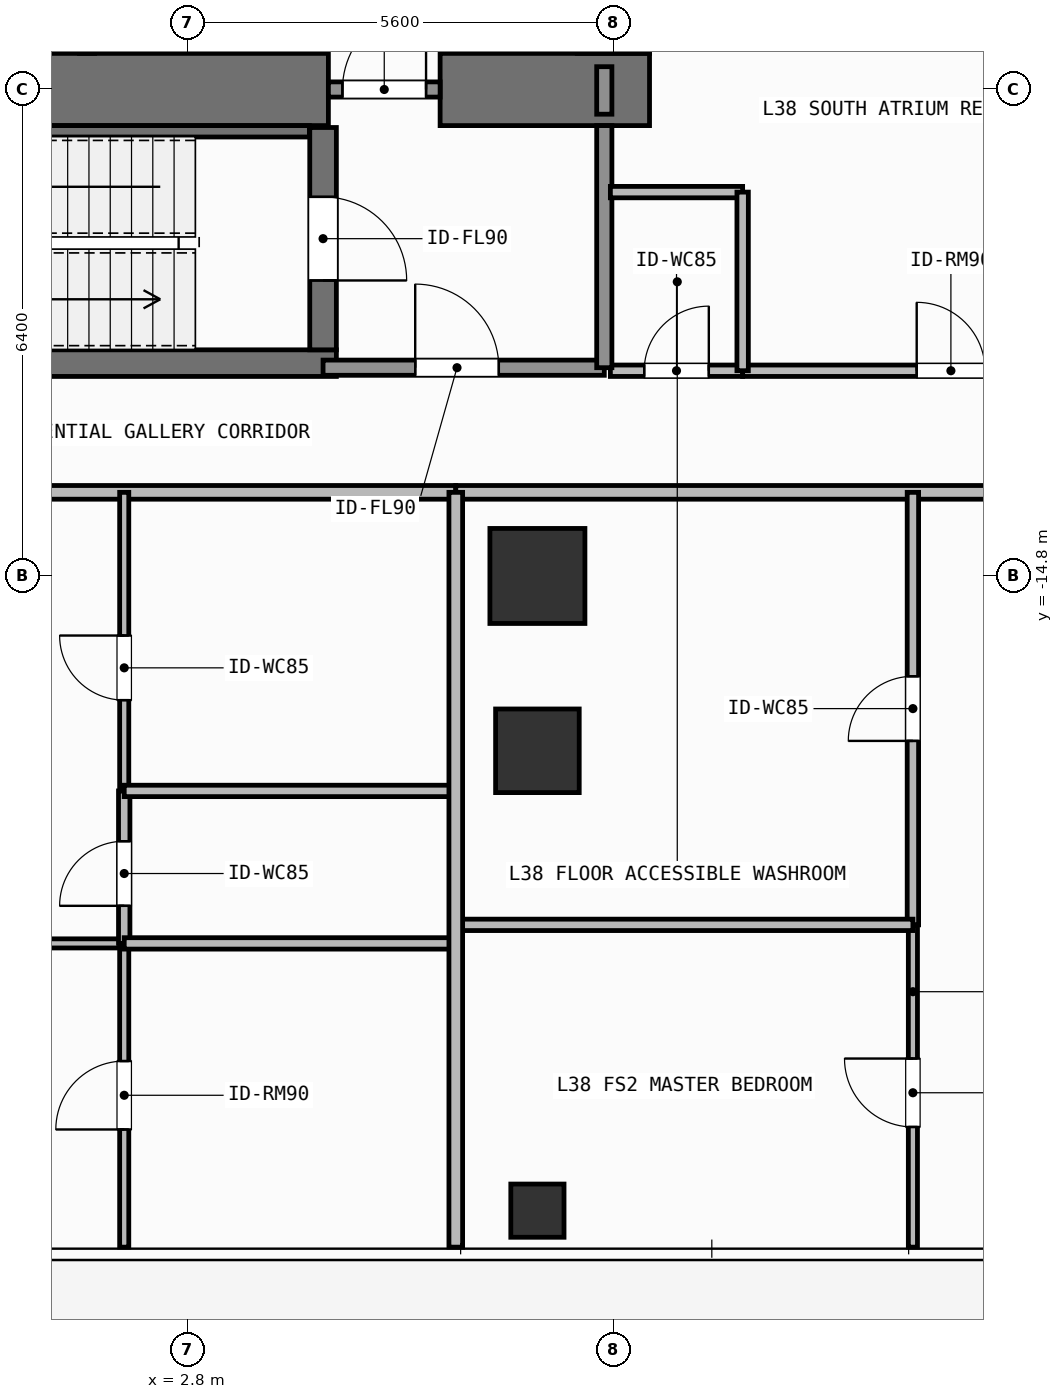
"""IFC4 building model, lengths in metres.
Left out: names, types, materials, properties, quantities, classifications, styles, units other than length and angle.
Written with IfcOpenShell. Run it as: python <this file> out.ifc"""

import sys

from ifc_helpers import new_model, si_unit, direction, frame, frame_2d, origin, origin_2d, place, context, subcontext, project, spatial, rectangle, hollow_rectangle, extrude, element, fill, save


model = new_model("IFC4")
c1 = context("Model", 3, precision=1e-05, world=origin(), true_north=direction((0.0, 1.0)))
c2 = subcontext(c1, "Body", "Model", "MODEL_VIEW")
j1 = project(units=[si_unit("LENGTHUNIT", "METRE"), si_unit("PLANEANGLEUNIT", "RADIAN")], contexts=[c1])
p1 = place(None, origin())
s1 = spatial("IfcSite", under=j1, at=p1, CompositionType="ELEMENT")
p2 = place(p1, origin())
s2 = spatial("IfcBuilding", under=s1, at=p2, CompositionType="ELEMENT")
p3 = place(p2, frame((0.0, 0.0, 152.4)))
s3 = spatial("IfcBuildingStorey", under=s2, at=p3, CompositionType="ELEMENT", Elevation=152.4)
p4 = place(p3, frame((-2.62, -8.4, 0.0), z_axis=(0.0, 0.0, 1.0), x_axis=(1.0, 0.0, 0.0)))
e1 = element("IfcWall", 1, at=p4, inside=s3, PredefinedType="SHEAR", context=c2, shape_type="SweptSolid", body=[
    extrude(rectangle(XDim=7.27, YDim=0.95, at=frame_2d((3.635, 0.0))), origin(), (0.0, 0.0, 1.0), 3.9),
])
p5 = place(p3, frame((6.12, -8.4, 0.0), z_axis=(0.0, 0.0, 1.0), x_axis=(1.0, 0.0, 0.0)))
e2 = element("IfcWall", 2, at=p5, inside=s3, PredefinedType="SHEAR", context=c2, shape_type="SweptSolid", body=[
    extrude(rectangle(XDim=2.755, YDim=0.95, at=frame_2d((1.377, 0.0))), origin(), (0.0, 0.0, 1.0), 3.9),
])
p6 = place(p3, frame((8.4, -7.925, 0.0), z_axis=(0.0, 0.0, 1.0), x_axis=(0.0, 1.0, 0.0)))
e3 = element("IfcWall", 3, at=p6, inside=s3, PredefinedType="SHEAR", context=c2, shape_type="SweptSolid", body=[
    extrude(rectangle(XDim=2.1, YDim=0.95, at=frame_2d((1.05, 0.0))), origin(), (0.0, 0.0, 1.0), 3.9),
])
p7 = place(p3, frame((-2.555, -12.0, 0.0), z_axis=(0.0, 0.0, 1.0), x_axis=(1.0, 0.0, 0.0)))
e4 = element("IfcWall", 4, at=p7, inside=s3, PredefinedType="SHEAR", context=c2, shape_type="SweptSolid", body=[
    extrude(rectangle(XDim=7.31, YDim=0.35, at=frame_2d((3.655, 0.0))), origin(), (0.0, 0.0, 1.0), 3.9),
])
p8 = place(p3, frame((-2.2, -8.95, 0.0), z_axis=(0.0, 0.0, 1.0), x_axis=(1.0, 0.0, 0.0)))
e5 = element("IfcWall", 5, at=p8, inside=s3, PredefinedType="SHEAR", context=c2, shape_type="SweptSolid", body=[
    extrude(rectangle(XDim=6.6, YDim=0.15, at=frame_2d((3.3, 0.0))), origin(), (0.0, 0.0, 1.0), 3.9),
])
p9 = place(p3, frame((4.58, -8.9, 0.0), z_axis=(0.0, 0.0, 1.0), x_axis=(0.0, -1.0, 0.0)))
e6 = element("IfcWall", 6, at=p9, inside=s3, PredefinedType="SHEAR", context=c2, shape_type="SweptSolid", body=[
    extrude(rectangle(XDim=2.925, YDim=0.35, at=frame_2d((1.462, 0.0))), origin(), (0.0, 0.0, 1.0), 3.9),
])
p10 = place(p9, frame((0.913, 0.0, 0.0)))
e7 = element("IfcOpeningElement", 7, at=p10, cuts=e6, PredefinedType="OPENING", context=c2, shape_type="SweptSolid", body=[
    extrude(rectangle(XDim=1.1, YDim=2.15, at=frame_2d((0.55, 1.075))), frame((0.0, 0.185, 0.0), z_axis=(0.0, -1.0, 0.0), x_axis=(1.0, 0.0, 0.0)), (0.0, 0.0, 1.0), 0.37),
])
p11 = place(p3, frame((7.4, -14.8, 0.0), z_axis=(0.0, 0.0, 1.0), x_axis=(1.0, 0.0, 0.0)))
e8 = element("IfcColumn", 8, at=p11, inside=s3, PredefinedType="COLUMN", context=c2, shape_type="SweptSolid", body=[
    extrude(rectangle(XDim=1.25, YDim=1.25, at=origin_2d()), origin(), (0.0, 0.0, 1.0), 3.9),
])
p12 = place(p3, frame((7.4, -17.1, 0.0), z_axis=(0.0, 0.0, 1.0), x_axis=(1.0, 0.0, 0.0)))
e9 = element("IfcColumn", 9, at=p12, inside=s3, PredefinedType="COLUMN", context=c2, shape_type="SweptSolid", body=[
    extrude(rectangle(XDim=1.1, YDim=1.1, at=origin_2d()), origin(), (0.0, 0.0, 1.0), 3.9),
])
p13 = place(p3, frame((7.4, -23.15, 0.0), z_axis=(0.0, 0.0, 1.0), x_axis=(1.0, 0.0, 0.0)))
e10 = element("IfcColumn", 10, at=p13, inside=s3, PredefinedType="COLUMN", context=c2, shape_type="SweptSolid", body=[
    extrude(hollow_rectangle(XDim=0.7, YDim=0.7, WallThickness=0.032, at=origin_2d()), origin(), (0.0, 0.0, 1.0), 3.9),
])
p14 = place(p3, frame((1.475, -7.925, 0.0), z_axis=(0.0, 0.0, 1.0), x_axis=(0.0, 1.0, 0.0)))
e11 = element("IfcWall", 11, at=p14, inside=s3, PredefinedType="SHEAR", context=c2, shape_type="SweptSolid", body=[
    extrude(rectangle(XDim=3.65, YDim=0.2, at=frame_2d((1.825, 0.0))), origin(), (0.0, 0.0, 1.0), 3.6),
])
p15 = place(p14, frame((1.575, 0.0, 0.0)))
e12 = element("IfcOpeningElement", 12, at=p15, cuts=e11, PredefinedType="OPENING", context=c2, shape_type="SweptSolid", body=[
    extrude(rectangle(XDim=1.1, YDim=2.2, at=frame_2d((0.55, 1.1))), frame((0.0, 0.11, 0.0), z_axis=(0.0, -1.0, 0.0), x_axis=(1.0, 0.0, 0.0)), (0.0, 0.0, 1.0), 0.22),
])
p16 = place(p3, frame((4.58, -12.06, 0.0), z_axis=(0.0, 0.0, 1.0), x_axis=(1.0, 0.0, 0.0)))
e13 = element("IfcWall", 13, at=p16, inside=s3, PredefinedType="SOLIDWALL", context=c2, shape_type="SweptSolid", body=[
    extrude(rectangle(XDim=3.7, YDim=0.2, at=frame_2d((1.85, 0.0))), origin(), (0.0, 0.0, 1.0), 3.6),
])
p17 = place(p16, frame((1.212, 0.0, 0.0)))
e14 = element("IfcOpeningElement", 14, at=p17, cuts=e13, PredefinedType="OPENING", context=c2, shape_type="SweptSolid", body=[
    extrude(rectangle(XDim=1.1, YDim=2.15, at=frame_2d((0.55, 1.075))), frame((0.0, 0.11, 0.0), z_axis=(0.0, -1.0, 0.0), x_axis=(1.0, 0.0, 0.0)), (0.0, 0.0, 1.0), 0.22),
])
p18 = place(p3, frame((4.65, -8.4, 0.0), z_axis=(0.0, 0.0, 1.0), x_axis=(1.0, 0.0, 0.0)))
e15 = element("IfcWall", 15, at=p18, inside=s3, PredefinedType="SOLIDWALL", context=c2, shape_type="SweptSolid", body=[
    extrude(rectangle(XDim=1.47, YDim=0.2, at=frame_2d((0.735, 0.0))), origin(), (0.0, 0.0, 1.0), 2.64),
])
p19 = place(p18, frame((0.185, 0.0, 0.0)))
e16 = element("IfcOpeningElement", 16, at=p19, cuts=e15, PredefinedType="OPENING", context=c2, shape_type="SweptSolid", body=[
    extrude(rectangle(XDim=1.1, YDim=2.15, at=frame_2d((0.55, 1.075))), frame((0.0, 0.11, 0.0), z_axis=(0.0, -1.0, 0.0), x_axis=(1.0, 0.0, 0.0)), (0.0, 0.0, 1.0), 0.22),
])
p20 = place(p3, frame((8.36, -12.1, 0.0), z_axis=(0.0, 0.0, 1.0), x_axis=(1.0, 0.0, 0.0)))
e17 = element("IfcWall", 17, at=p20, inside=s3, PredefinedType="PARTITIONING", context=c2, shape_type="SweptSolid", body=[
    extrude(rectangle(XDim=1.74, YDim=0.15, at=frame_2d((0.87, 0.0))), origin(), (0.0, 0.0, 1.0), 3.6),
])
p21 = place(p20, frame((0.445, 0.0, 0.0)))
e18 = element("IfcOpeningElement", 18, at=p21, cuts=e17, PredefinedType="OPENING", context=c2, shape_type="SweptSolid", body=[
    extrude(rectangle(XDim=0.85, YDim=2.1, at=frame_2d((0.425, 1.05))), frame((0.0, 0.085, 0.0), z_axis=(0.0, -1.0, 0.0), x_axis=(1.0, 0.0, 0.0)), (0.0, 0.0, 1.0), 0.17),
])
p22 = place(p3, frame((10.1, -12.1, 0.0), z_axis=(0.0, 0.0, 1.0), x_axis=(1.0, 0.0, 0.0)))
e19 = element("IfcWall", 19, at=p22, inside=s3, PredefinedType="PARTITIONING", context=c2, shape_type="SweptSolid", body=[
    extrude(rectangle(XDim=5.48, YDim=0.15, at=frame_2d((2.74, 0.0))), origin(), (0.0, 0.0, 1.0), 3.6),
])
p23 = place(p22, frame((2.29, 0.0, 0.0)))
e20 = element("IfcOpeningElement", 20, at=p23, cuts=e19, PredefinedType="OPENING", context=c2, shape_type="SweptSolid", body=[
    extrude(rectangle(XDim=0.9, YDim=2.1, at=frame_2d((0.45, 1.05))), frame((0.0, 0.085, 0.0), z_axis=(0.0, -1.0, 0.0), x_axis=(1.0, 0.0, 0.0)), (0.0, 0.0, 1.0), 0.17),
])
p24 = place(p3, frame((-16.32, -13.7, 0.0), z_axis=(0.0, 0.0, 1.0), x_axis=(1.0, 0.0, 0.0)))
e21 = element("IfcWall", 21, at=p24, inside=s3, PredefinedType="PARTITIONING", context=c2, shape_type="SweptSolid", body=[
    extrude(rectangle(XDim=22.646, YDim=0.18, at=frame_2d((11.323, 0.0))), origin(), (0.0, 0.0, 1.0), 3.6),
])
p25 = place(p24, frame((11.271, 0.0, 0.0)))
e22 = element("IfcOpeningElement", 22, at=p25, cuts=e21, PredefinedType="OPENING", context=c2, shape_type="SweptSolid", body=[
    extrude(rectangle(XDim=1.0, YDim=2.2, at=frame_2d((0.5, 1.1))), frame((0.0, 0.1, 0.0), z_axis=(0.0, -1.0, 0.0), x_axis=(1.0, 0.0, 0.0)), (0.0, 0.0, 1.0), 0.2),
])
p26 = place(p3, frame((-10.926, -19.634, 0.0), z_axis=(0.0, 0.0, 1.0), x_axis=(1.0, 0.0, 0.0)))
e23 = element("IfcWall", 23, at=p26, inside=s3, PredefinedType="PARTITIONING", context=c2, shape_type="SweptSolid", body=[
    extrude(rectangle(XDim=12.89, YDim=0.12, at=frame_2d((6.445, 0.0))), origin(), (0.0, 0.0, 1.0), 3.6),
])
p27 = place(p26, frame((5.905, 0.0, 0.0)))
e24 = element("IfcOpeningElement", 24, at=p27, cuts=e23, PredefinedType="OPENING", context=c2, shape_type="SweptSolid", body=[
    extrude(rectangle(XDim=0.9, YDim=2.1, at=frame_2d((0.45, 1.05))), frame((0.0, 0.07, 0.0), z_axis=(0.0, -1.0, 0.0), x_axis=(1.0, 0.0, 0.0)), (0.0, 0.0, 1.0), 0.14),
])
p28 = place(p3, frame((1.964, -19.634, 0.0), z_axis=(0.0, 0.0, 1.0), x_axis=(0.0, 1.0, 0.0)))
e25 = element("IfcWall", 25, at=p28, inside=s3, PredefinedType="PARTITIONING", context=c2, shape_type="SweptSolid", body=[
    extrude(rectangle(XDim=2.006, YDim=0.15, at=frame_2d((1.003, 0.0))), origin(), (0.0, 0.0, 1.0), 3.6),
])
p29 = place(p28, frame((0.494, 0.0, 0.0)))
e26 = element("IfcOpeningElement", 26, at=p29, cuts=e25, PredefinedType="OPENING", context=c2, shape_type="SweptSolid", body=[
    extrude(rectangle(XDim=0.85, YDim=2.1, at=frame_2d((0.425, 1.05))), frame((0.0, 0.085, 0.0), z_axis=(0.0, -1.0, 0.0), x_axis=(1.0, 0.0, 0.0)), (0.0, 0.0, 1.0), 0.17),
])
p30 = place(p3, frame((1.964, -17.628, 0.0), z_axis=(0.0, 0.0, 1.0), x_axis=(0.0, 1.0, 0.0)))
e27 = element("IfcWall", 27, at=p30, inside=s3, PredefinedType="PARTITIONING", context=c2, shape_type="SweptSolid", body=[
    extrude(rectangle(XDim=3.928, YDim=0.12, at=frame_2d((1.964, 0.0))), origin(), (0.0, 0.0, 1.0), 3.6),
])
p31 = place(p30, frame((1.194, 0.0, 0.0)))
e28 = element("IfcOpeningElement", 28, at=p31, cuts=e27, PredefinedType="OPENING", context=c2, shape_type="SweptSolid", body=[
    extrude(rectangle(XDim=0.85, YDim=2.1, at=frame_2d((0.425, 1.05))), frame((0.0, 0.07, 0.0), z_axis=(0.0, -1.0, 0.0), x_axis=(1.0, 0.0, 0.0)), (0.0, 0.0, 1.0), 0.14),
])
p32 = place(p3, frame((1.964, -23.63, 0.0), z_axis=(0.0, 0.0, 1.0), x_axis=(0.0, 1.0, 0.0)))
e29 = element("IfcWall", 29, at=p32, inside=s3, PredefinedType="PARTITIONING", context=c2, shape_type="SweptSolid", body=[
    extrude(rectangle(XDim=3.996, YDim=0.12, at=frame_2d((1.998, 0.0))), origin(), (0.0, 0.0, 1.0), 3.6),
])
p33 = place(p32, frame((1.548, 0.0, 0.0)))
e30 = element("IfcOpeningElement", 30, at=p33, cuts=e29, PredefinedType="OPENING", context=c2, shape_type="SweptSolid", body=[
    extrude(rectangle(XDim=0.9, YDim=2.1, at=frame_2d((0.45, 1.05))), frame((0.0, 0.07, 0.0), z_axis=(0.0, -1.0, 0.0), x_axis=(1.0, 0.0, 0.0)), (0.0, 0.0, 1.0), 0.14),
])
p34 = place(p3, frame((6.326, -13.7, 0.0), z_axis=(0.0, 0.0, 1.0), x_axis=(1.0, 0.0, 0.0)))
e31 = element("IfcWall", 31, at=p34, inside=s3, PredefinedType="PARTITIONING", context=c2, shape_type="SweptSolid", body=[
    extrude(rectangle(XDim=17.794, YDim=0.18, at=frame_2d((8.897, 0.0))), origin(), (0.0, 0.0, 1.0), 3.6),
])
p35 = place(p34, frame((9.292, 0.0, 0.0)))
e32 = element("IfcOpeningElement", 32, at=p35, cuts=e31, PredefinedType="OPENING", context=c2, shape_type="SweptSolid", body=[
    extrude(rectangle(XDim=1.0, YDim=2.2, at=frame_2d((0.5, 1.1))), frame((0.0, 0.1, 0.0), z_axis=(0.0, -1.0, 0.0), x_axis=(1.0, 0.0, 0.0)), (0.0, 0.0, 1.0), 0.2),
])
p36 = place(p3, frame((12.34, -19.39, 0.0), z_axis=(0.0, 0.0, 1.0), x_axis=(0.0, 1.0, 0.0)))
e33 = element("IfcWall", 33, at=p36, inside=s3, PredefinedType="PARTITIONING", context=c2, shape_type="SweptSolid", body=[
    extrude(rectangle(XDim=5.69, YDim=0.15, at=frame_2d((2.845, 0.0))), origin(), (0.0, 0.0, 1.0), 3.6),
])
p37 = place(p36, frame((2.42, 0.0, 0.0)))
e34 = element("IfcOpeningElement", 34, at=p37, cuts=e33, PredefinedType="OPENING", context=c2, shape_type="SweptSolid", body=[
    extrude(rectangle(XDim=0.85, YDim=2.1, at=frame_2d((0.425, 1.05))), frame((0.0, 0.085, 0.0), z_axis=(0.0, -1.0, 0.0), x_axis=(1.0, 0.0, 0.0)), (0.0, 0.0, 1.0), 0.17),
])
p38 = place(p3, frame((12.34, -23.63, 0.0), z_axis=(0.0, 0.0, 1.0), x_axis=(0.0, 1.0, 0.0)))
e35 = element("IfcWall", 35, at=p38, inside=s3, PredefinedType="PARTITIONING", context=c2, shape_type="SweptSolid", body=[
    extrude(rectangle(XDim=4.24, YDim=0.12, at=frame_2d((2.12, 0.0))), origin(), (0.0, 0.0, 1.0), 3.6),
])
p39 = place(p38, frame((1.581, 0.0, 0.0)))
e36 = element("IfcOpeningElement", 36, at=p39, cuts=e35, PredefinedType="OPENING", context=c2, shape_type="SweptSolid", body=[
    extrude(rectangle(XDim=0.9, YDim=2.1, at=frame_2d((0.45, 1.05))), frame((0.0, 0.07, 0.0), z_axis=(0.0, -1.0, 0.0), x_axis=(1.0, 0.0, 0.0)), (0.0, 0.0, 1.0), 0.14),
])
p40 = place(p3, frame((8.28, -12.06, 0.0), z_axis=(0.0, 0.0, 1.0), x_axis=(0.0, 1.0, 0.0)))
e37 = element("IfcWall", 37, at=p40, inside=s3, PredefinedType="SOLIDWALL", context=c2, shape_type="SweptSolid", body=[
    extrude(rectangle(XDim=3.185, YDim=0.2, at=frame_2d((1.593, 0.0))), origin(), (0.0, 0.0, 1.0), 3.6),
])
p41 = place(p3, frame((8.28, -8.725, 0.0), z_axis=(0.0, 0.0, 1.0), x_axis=(0.0, 1.0, 0.0)))
e38 = element("IfcWall", 38, at=p41, inside=s3, PredefinedType="SOLIDWALL", context=c2, shape_type="SweptSolid", body=[
    extrude(rectangle(XDim=0.625, YDim=0.2, at=frame_2d((0.312, 0.0))), origin(), (0.0, 0.0, 1.0), 3.6),
])
p42 = place(p3, frame((8.36, -9.75, 0.0), z_axis=(0.0, 0.0, 1.0), x_axis=(1.0, 0.0, 0.0)))
e39 = element("IfcWall", 39, at=p42, inside=s3, PredefinedType="PARTITIONING", context=c2, shape_type="SweptSolid", body=[
    extrude(rectangle(XDim=1.74, YDim=0.15, at=frame_2d((0.87, 0.0))), origin(), (0.0, 0.0, 1.0), 3.6),
])
p43 = place(p3, frame((10.1, -12.1, 0.0), z_axis=(0.0, 0.0, 1.0), x_axis=(0.0, 1.0, 0.0)))
e40 = element("IfcWall", 40, at=p43, inside=s3, PredefinedType="PARTITIONING", context=c2, shape_type="SweptSolid", body=[
    extrude(rectangle(XDim=2.35, YDim=0.15, at=frame_2d((1.175, 0.0))), origin(), (0.0, 0.0, 1.0), 3.6),
])
for number, where, z_axis, x_axis in (
    (41, (1.964, -17.628, 0.0), (0.0, 0.0, 1.0), (1.0, 0.0, 0.0)),
    (42, (1.964, -19.634, 0.0), (0.0, 0.0, 1.0), (1.0, 0.0, 0.0)),
):
    element("IfcWall", number, at=place(p3, frame(where, z_axis=z_axis, x_axis=x_axis)), inside=s3, PredefinedType="PARTITIONING", context=c2, shape_type="SweptSolid", body=[
        extrude(rectangle(XDim=4.362, YDim=0.15, at=frame_2d((2.181, 0.0))), origin(), (0.0, 0.0, 1.0), 3.6),
    ])
p44 = place(p3, frame((6.326, -19.39, 0.0), z_axis=(0.0, 0.0, 1.0), x_axis=(1.0, 0.0, 0.0)))
e43 = element("IfcWall", 43, at=p44, inside=s3, PredefinedType="PARTITIONING", context=c2, shape_type="SweptSolid", body=[
    extrude(rectangle(XDim=6.014, YDim=0.15, at=frame_2d((3.007, 0.0))), origin(), (0.0, 0.0, 1.0), 3.6),
])
p45 = place(p3, frame((6.326, -23.63, 0.0), z_axis=(0.0, 0.0, 1.0), x_axis=(0.0, 1.0, 0.0)))
e44 = element("IfcWall", 44, at=p45, inside=s3, PredefinedType="PARTITIONING", context=c2, shape_type="SweptSolid", body=[
    extrude(rectangle(XDim=9.93, YDim=0.18, at=frame_2d((4.965, 0.0))), origin(), (0.0, 0.0, 1.0), 3.6),
])
p46 = place(p10, origin())
e45 = element("IfcDoor", 45, at=p46, inside=s3, OperationType="SINGLE_SWING_RIGHT", PredefinedType="DOOR", context=c2, shape_type="SweptSolid", body=[
    extrude(rectangle(XDim=1.1, YDim=2.15, at=frame_2d((0.55, 1.075))), frame((0.0, 0.025, 0.0), z_axis=(0.0, -1.0, 0.0), x_axis=(1.0, 0.0, 0.0)), (0.0, 0.0, 1.0), 0.05),
])
fill(e7, e45)
p47 = place(p17, origin())
e46 = element("IfcDoor", 46, at=p47, inside=s3, OperationType="SINGLE_SWING_LEFT", PredefinedType="DOOR", context=c2, shape_type="SweptSolid", body=[
    extrude(rectangle(XDim=1.1, YDim=2.15, at=frame_2d((0.55, 1.075))), frame((0.0, 0.025, 0.0), z_axis=(0.0, -1.0, 0.0), x_axis=(1.0, 0.0, 0.0)), (0.0, 0.0, 1.0), 0.05),
])
fill(e14, e46)
p48 = place(p19, origin())
e47 = element("IfcDoor", 47, at=p48, inside=s3, OperationType="SINGLE_SWING_RIGHT", PredefinedType="DOOR", context=c2, shape_type="SweptSolid", body=[
    extrude(rectangle(XDim=1.1, YDim=2.15, at=frame_2d((0.55, 1.075))), frame((0.0, 0.025, 0.0), z_axis=(0.0, -1.0, 0.0), x_axis=(1.0, 0.0, 0.0)), (0.0, 0.0, 1.0), 0.05),
])
fill(e16, e47)
p49 = place(p21, origin())
e48 = element("IfcDoor", 48, at=p49, inside=s3, OperationType="SINGLE_SWING_RIGHT", PredefinedType="DOOR", context=c2, shape_type="SweptSolid", body=[
    extrude(rectangle(XDim=0.85, YDim=2.1, at=frame_2d((0.425, 1.05))), frame((0.0, 0.025, 0.0), z_axis=(0.0, -1.0, 0.0), x_axis=(1.0, 0.0, 0.0)), (0.0, 0.0, 1.0), 0.05),
])
fill(e18, e48)
p50 = place(p23, origin())
e49 = element("IfcDoor", 49, at=p50, inside=s3, OperationType="SINGLE_SWING_LEFT", PredefinedType="DOOR", context=c2, shape_type="SweptSolid", body=[
    extrude(rectangle(XDim=0.9, YDim=2.1, at=frame_2d((0.45, 1.05))), frame((0.0, 0.025, 0.0), z_axis=(0.0, -1.0, 0.0), x_axis=(1.0, 0.0, 0.0)), (0.0, 0.0, 1.0), 0.05),
])
fill(e20, e49)
p51 = place(p29, origin())
e50 = element("IfcDoor", 50, at=p51, inside=s3, OperationType="SINGLE_SWING_LEFT", PredefinedType="DOOR", context=c2, shape_type="SweptSolid", body=[
    extrude(rectangle(XDim=0.85, YDim=2.1, at=frame_2d((0.425, 1.05))), frame((0.0, 0.025, 0.0), z_axis=(0.0, -1.0, 0.0), x_axis=(1.0, 0.0, 0.0)), (0.0, 0.0, 1.0), 0.05),
])
fill(e26, e50)
p52 = place(p31, origin())
e51 = element("IfcDoor", 51, at=p52, inside=s3, OperationType="SINGLE_SWING_RIGHT", PredefinedType="DOOR", context=c2, shape_type="SweptSolid", body=[
    extrude(rectangle(XDim=0.85, YDim=2.1, at=frame_2d((0.425, 1.05))), frame((0.0, 0.025, 0.0), z_axis=(0.0, -1.0, 0.0), x_axis=(1.0, 0.0, 0.0)), (0.0, 0.0, 1.0), 0.05),
])
fill(e28, e51)
p53 = place(p33, origin())
e52 = element("IfcDoor", 52, at=p53, inside=s3, OperationType="SINGLE_SWING_LEFT", PredefinedType="DOOR", context=c2, shape_type="SweptSolid", body=[
    extrude(rectangle(XDim=0.9, YDim=2.1, at=frame_2d((0.45, 1.05))), frame((0.0, 0.025, 0.0), z_axis=(0.0, -1.0, 0.0), x_axis=(1.0, 0.0, 0.0)), (0.0, 0.0, 1.0), 0.05),
])
fill(e30, e52)
p54 = place(p37, origin())
e53 = element("IfcDoor", 53, at=p54, inside=s3, OperationType="SINGLE_SWING_LEFT", PredefinedType="DOOR", context=c2, shape_type="SweptSolid", body=[
    extrude(rectangle(XDim=0.85, YDim=2.1, at=frame_2d((0.425, 1.05))), frame((0.0, 0.025, 0.0), z_axis=(0.0, -1.0, 0.0), x_axis=(1.0, 0.0, 0.0)), (0.0, 0.0, 1.0), 0.05),
])
fill(e34, e53)
p55 = place(p39, origin())
e54 = element("IfcDoor", 54, at=p55, inside=s3, OperationType="SINGLE_SWING_RIGHT", PredefinedType="DOOR", context=c2, shape_type="SweptSolid", body=[
    extrude(rectangle(XDim=0.9, YDim=2.1, at=frame_2d((0.45, 1.05))), frame((0.0, 0.025, 0.0), z_axis=(0.0, -1.0, 0.0), x_axis=(1.0, 0.0, 0.0)), (0.0, 0.0, 1.0), 0.05),
])
fill(e36, e54)
save(model, sys.argv[1])
